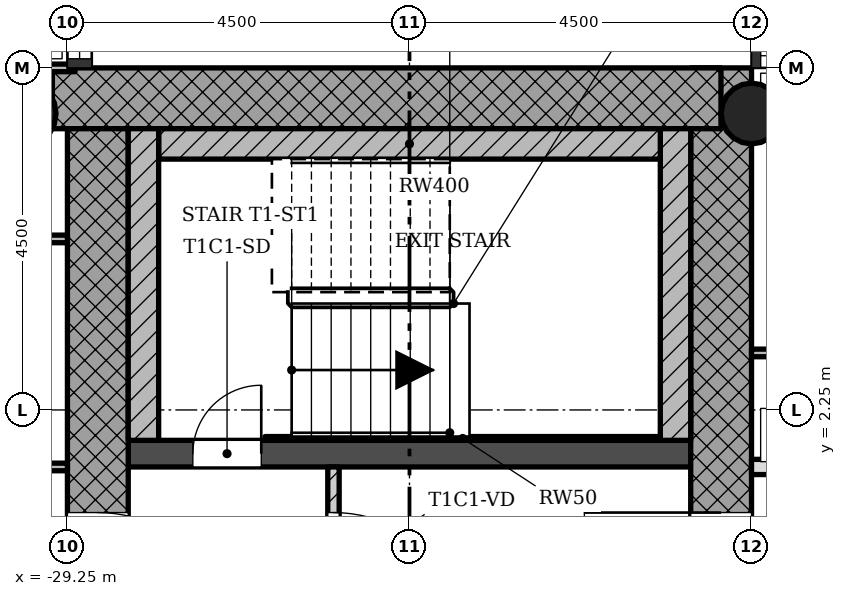
"""IFC4 building model, lengths in metres.
Left out: names, types, materials, properties, quantities, classifications, styles, units other than length and angle.
Written with IfcOpenShell. Run it as: python <this file> out.ifc"""

import sys

from ifc_helpers import new_model, si_unit, direction, frame, frame_2d, origin, origin_2d, place, context, subcontext, project, spatial, rectangle, hollow_circle, extrude, element, fill, save


model = new_model("IFC4")
c1 = context("Model", 3, precision=1e-05, world=origin(), true_north=direction((0.0, 1.0)))
c2 = subcontext(c1, "Body", "Model", "MODEL_VIEW")
j1 = project(units=[si_unit("LENGTHUNIT", "METRE"), si_unit("PLANEANGLEUNIT", "RADIAN")], contexts=[c1])
p1 = place(None, origin())
s1 = spatial("IfcSite", under=j1, at=p1, CompositionType="ELEMENT")
p2 = place(p1, origin())
s2 = spatial("IfcBuilding", under=s1, at=p2, CompositionType="ELEMENT")
p3 = place(p2, frame((0.0, 0.0, 154.1)))
s3 = spatial("IfcBuildingStorey", under=s2, at=p3, CompositionType="ELEMENT", Elevation=154.1)
p4 = place(p3, frame((-20.65, -5.95, 0.0), z_axis=(0.0, 0.0, 1.0), x_axis=(0.0, 1.0, 0.0)))
e1 = element("IfcWall", 1, at=p4, inside=s3, PredefinedType="SHEAR", context=c2, shape_type="SweptSolid", body=[
    extrude(rectangle(XDim=12.7, YDim=0.8, at=frame_2d((6.35, 0.0))), origin(), (0.0, 0.0, 1.0), 3.4),
])
p5 = place(p4, frame((5.05, 0.0, 0.0)))
e2 = element("IfcOpeningElement", 2, at=p5, cuts=e1, PredefinedType="OPENING", context=c2, shape_type="SweptSolid", body=[
    extrude(rectangle(XDim=1.8, YDim=2.1, at=frame_2d((0.9, 1.05))), frame((0.0, 0.41, 0.0), z_axis=(0.0, -1.0, 0.0), x_axis=(1.0, 0.0, 0.0)), (0.0, 0.0, 1.0), 0.82),
])
p6 = place(p3, frame((-20.652, 6.35, 0.0), z_axis=(0.0, 0.0, 1.0), x_axis=(-1.0, 0.0, 0.0)))
e3 = element("IfcWall", 3, at=p6, inside=s3, PredefinedType="SHEAR", context=c2, shape_type="SweptSolid", body=[
    extrude(rectangle(XDim=8.796, YDim=0.8, at=frame_2d((4.398, 0.0))), origin(), (0.0, 0.0, 1.0), 3.4),
])
p7 = place(p3, frame((-28.85, 5.95, 0.0), z_axis=(0.0, 0.0, 1.0), x_axis=(0.0, -1.0, 0.0)))
e4 = element("IfcWall", 4, at=p7, inside=s3, PredefinedType="SHEAR", context=c2, shape_type="SweptSolid", body=[
    extrude(rectangle(XDim=12.7, YDim=0.8, at=frame_2d((6.35, 0.0))), origin(), (0.0, 0.0, 1.0), 3.4),
])
p8 = place(p7, frame((5.05, 0.0, 0.0)))
e5 = element("IfcOpeningElement", 5, at=p8, cuts=e4, PredefinedType="OPENING", context=c2, shape_type="SweptSolid", body=[
    extrude(rectangle(XDim=1.8, YDim=2.1, at=frame_2d((0.9, 1.05))), frame((0.0, 0.41, 0.0), z_axis=(0.0, -1.0, 0.0), x_axis=(1.0, 0.0, 0.0)), (0.0, 0.0, 1.0), 0.82),
])
p9 = place(p3, frame((-28.45, 1.675, 0.0), z_axis=(0.0, 0.0, 1.0), x_axis=(1.0, 0.0, 0.0)))
e6 = element("IfcWall", 6, at=p9, inside=s3, PredefinedType="SHEAR", context=c2, shape_type="SweptSolid", body=[
    extrude(rectangle(XDim=7.4, YDim=0.35, at=frame_2d((3.7, 0.0))), origin(), (0.0, 0.0, 1.0), 3.4),
])
p10 = place(p9, frame((0.85, 0.0, 0.0)))
e7 = element("IfcOpeningElement", 7, at=p10, cuts=e6, PredefinedType="OPENING", context=c2, shape_type="SweptSolid", body=[
    extrude(rectangle(XDim=0.9, YDim=2.1, at=frame_2d((0.45, 1.05))), frame((0.0, 0.185, 0.0), z_axis=(0.0, -1.0, 0.0), x_axis=(1.0, 0.0, 0.0)), (0.0, 0.0, 1.0), 0.37),
])
p11 = place(p3, frame((-20.25, 6.15, 0.0), z_axis=(0.0, 0.0, 1.0), x_axis=(1.0, 0.0, 0.0)))
e8 = element("IfcColumn", 8, at=p11, inside=s3, PredefinedType="COLUMN", context=c2, shape_type="SweptSolid", body=[
    extrude(hollow_circle(Radius=0.4, WallThickness=0.028, at=origin_2d()), origin(), (0.0, 0.0, 1.0), 3.4),
])
p12 = place(p3, frame((-29.85, 6.15, 0.0), z_axis=(0.0, 0.0, 1.0), x_axis=(1.0, 0.0, 0.0)))
e9 = element("IfcColumn", 9, at=p12, inside=s3, PredefinedType="COLUMN", context=c2, shape_type="SweptSolid", body=[
    extrude(hollow_circle(Radius=0.45, WallThickness=0.032, at=origin_2d()), origin(), (0.0, 0.0, 1.0), 3.4),
])
p13 = place(p3, frame((-25.75, -1.5, 0.0), z_axis=(0.0, 0.0, 1.0), x_axis=(0.0, 1.0, 0.0)))
e10 = element("IfcWall", 10, at=p13, inside=s3, PredefinedType="PARTITIONING", context=c2, shape_type="SweptSolid", body=[
    extrude(rectangle(XDim=3.0, YDim=0.15, at=frame_2d((1.5, 0.0))), origin(), (0.0, 0.0, 1.0), 3.0),
])
p14 = place(p13, frame((0.6, 0.0, 0.0)))
e11 = element("IfcOpeningElement", 11, at=p14, cuts=e10, PredefinedType="OPENING", context=c2, shape_type="SweptSolid", body=[
    extrude(rectangle(XDim=1.8, YDim=2.1, at=frame_2d((0.9, 1.05))), frame((0.0, 0.085, 0.0), z_axis=(0.0, -1.0, 0.0), x_axis=(1.0, 0.0, 0.0)), (0.0, 0.0, 1.0), 0.17),
])
p15 = place(p3, frame((-31.5, 1.5, 0.0), z_axis=(0.0, 0.0, 1.0), x_axis=(1.0, 0.0, 0.0)))
e12 = element("IfcWall", 12, at=p15, inside=s3, PredefinedType="PARTITIONING", context=c2, shape_type="SweptSolid", body=[
    extrude(rectangle(XDim=2.25, YDim=0.1, at=frame_2d((1.125, 0.0))), origin(), (0.0, 0.0, 1.0), 3.0),
])
p16 = place(p3, frame((-20.25, 1.5, 0.0), z_axis=(0.0, 0.0, 1.0), x_axis=(1.0, 0.0, 0.0)))
e13 = element("IfcWall", 13, at=p16, inside=s3, PredefinedType="SOLIDWALL", context=c2, shape_type="SweptSolid", body=[
    extrude(rectangle(XDim=4.5, YDim=0.2, at=frame_2d((2.25, 0.0))), origin(), (0.0, 0.0, 1.0), 3.0),
])
p17 = place(p16, frame((3.0, 0.0, 0.0)))
e14 = element("IfcOpeningElement", 14, at=p17, cuts=e13, PredefinedType="OPENING", context=c2, shape_type="SweptSolid", body=[
    extrude(rectangle(XDim=0.9, YDim=2.1, at=frame_2d((0.45, 1.05))), frame((0.0, 0.11, 0.0), z_axis=(0.0, -1.0, 0.0), x_axis=(1.0, 0.0, 0.0)), (0.0, 0.0, 1.0), 0.22),
])
p18 = place(p3, frame((-20.25, 3.0, 0.0), z_axis=(0.0, 0.0, 1.0), x_axis=(1.0, 0.0, 0.0)))
e15 = element("IfcWall", 15, at=p18, inside=s3, PredefinedType="PARTITIONING", context=c2, shape_type="SweptSolid", body=[
    extrude(rectangle(XDim=2.4, YDim=0.1, at=frame_2d((1.2, 0.0))), origin(), (0.0, 0.0, 1.0), 3.0),
])
p19 = place(p18, frame((0.75, 0.0, 0.0)))
e16 = element("IfcOpeningElement", 16, at=p19, cuts=e15, PredefinedType="OPENING", context=c2, shape_type="SweptSolid", body=[
    extrude(rectangle(XDim=0.9, YDim=2.1, at=frame_2d((0.45, 1.05))), frame((0.0, 0.06, 0.0), z_axis=(0.0, -1.0, 0.0), x_axis=(1.0, 0.0, 0.0)), (0.0, 0.0, 1.0), 0.12),
])
p20 = place(p3, frame((-35.1, 4.5, 0.0), z_axis=(0.0, 0.0, 1.0), x_axis=(1.0, 0.0, 0.0)))
e17 = element("IfcWall", 17, at=p20, inside=s3, PredefinedType="PARTITIONING", context=c2, shape_type="SweptSolid", body=[
    extrude(rectangle(XDim=5.85, YDim=0.1, at=frame_2d((2.925, 0.0))), origin(), (0.0, 0.0, 1.0), 3.0),
])
p21 = place(p20, frame((1.35, 0.0, 0.0)))
e18 = element("IfcOpeningElement", 18, at=p21, cuts=e17, PredefinedType="OPENING", context=c2, shape_type="SweptSolid", body=[
    extrude(rectangle(XDim=0.9, YDim=2.1, at=frame_2d((0.45, 1.05))), frame((0.0, 0.06, 0.0), z_axis=(0.0, -1.0, 0.0), x_axis=(1.0, 0.0, 0.0)), (0.0, 0.0, 1.0), 0.12),
])
p22 = place(p3, frame((-35.1, 6.75, 0.0), z_axis=(0.0, 0.0, 1.0), x_axis=(1.0, 0.0, 0.0)))
e19 = element("IfcWall", 19, at=p22, inside=s3, PredefinedType="PARTITIONING", context=c2, shape_type="SweptSolid", body=[
    extrude(rectangle(XDim=5.95, YDim=0.1, at=frame_2d((2.975, 0.0))), origin(), (0.0, 0.0, 1.0), 3.0),
])
p23 = place(p3, frame((-21.25, 1.85, 0.0), z_axis=(0.0, 0.0, 1.0), x_axis=(0.0, 1.0, 0.0)))
e20 = element("IfcWall", 20, at=p23, inside=s3, PredefinedType="SHEAR", context=c2, shape_type="SweptSolid", body=[
    extrude(rectangle(XDim=4.1, YDim=0.4, at=frame_2d((2.05, 0.0))), origin(), (0.0, 0.0, 1.0), 3.4),
])
p24 = place(p3, frame((-28.05, 5.75, 0.0), z_axis=(0.0, 0.0, 1.0), x_axis=(1.0, 0.0, 0.0)))
e21 = element("IfcWall", 21, at=p24, inside=s3, PredefinedType="SHEAR", context=c2, shape_type="SweptSolid", body=[
    extrude(rectangle(XDim=6.6, YDim=0.4, at=frame_2d((3.3, 0.0))), origin(), (0.0, 0.0, 1.0), 3.4),
])
p25 = place(p3, frame((-28.25, 1.85, 0.0), z_axis=(0.0, 0.0, 1.0), x_axis=(0.0, 1.0, 0.0)))
e22 = element("IfcWall", 22, at=p25, inside=s3, PredefinedType="SHEAR", context=c2, shape_type="SweptSolid", body=[
    extrude(rectangle(XDim=4.1, YDim=0.4, at=frame_2d((2.05, 0.0))), origin(), (0.0, 0.0, 1.0), 3.4),
])
p26 = place(p3, frame((-26.65, 1.875, 0.0), z_axis=(0.0, 0.0, 1.0), x_axis=(1.0, 0.0, 0.0)))
e23 = element("IfcWall", 23, at=p26, inside=s3, PredefinedType="SHEAR", context=c2, shape_type="SweptSolid", body=[
    extrude(rectangle(XDim=5.2, YDim=0.05, at=frame_2d((2.6, 0.0))), origin(), (0.0, 0.0, 1.0), 3.4),
])
p27 = place(p14, origin())
e24 = element("IfcDoor", 24, at=p27, inside=s3, OperationType="SINGLE_SWING_LEFT", PredefinedType="DOOR", context=c2, shape_type="SweptSolid", body=[
    extrude(rectangle(XDim=1.8, YDim=2.1, at=frame_2d((0.9, 1.05))), frame((0.0, 0.025, 0.0), z_axis=(0.0, -1.0, 0.0), x_axis=(1.0, 0.0, 0.0)), (0.0, 0.0, 1.0), 0.05),
])
fill(e11, e24)
p28 = place(p10, origin())
e25 = element("IfcDoor", 25, at=p28, inside=s3, OperationType="SINGLE_SWING_LEFT", PredefinedType="DOOR", context=c2, shape_type="SweptSolid", body=[
    extrude(rectangle(XDim=0.9, YDim=2.1, at=frame_2d((0.45, 1.05))), frame((0.0, 0.025, 0.0), z_axis=(0.0, -1.0, 0.0), x_axis=(1.0, 0.0, 0.0)), (0.0, 0.0, 1.0), 0.05),
])
fill(e7, e25)
p29 = place(p8, origin())
e26 = element("IfcDoor", 26, at=p29, inside=s3, OperationType="SINGLE_SWING_LEFT", PredefinedType="DOOR", context=c2, shape_type="SweptSolid", body=[
    extrude(rectangle(XDim=1.8, YDim=2.1, at=frame_2d((0.9, 1.05))), frame((0.0, 0.025, 0.0), z_axis=(0.0, -1.0, 0.0), x_axis=(1.0, 0.0, 0.0)), (0.0, 0.0, 1.0), 0.05),
])
fill(e5, e26)
p30 = place(p5, origin())
e27 = element("IfcDoor", 27, at=p30, inside=s3, OperationType="SINGLE_SWING_LEFT", PredefinedType="DOOR", context=c2, shape_type="SweptSolid", body=[
    extrude(rectangle(XDim=1.8, YDim=2.1, at=frame_2d((0.9, 1.05))), frame((0.0, 0.025, 0.0), z_axis=(0.0, -1.0, 0.0), x_axis=(1.0, 0.0, 0.0)), (0.0, 0.0, 1.0), 0.05),
])
fill(e2, e27)
save(model, sys.argv[1])
